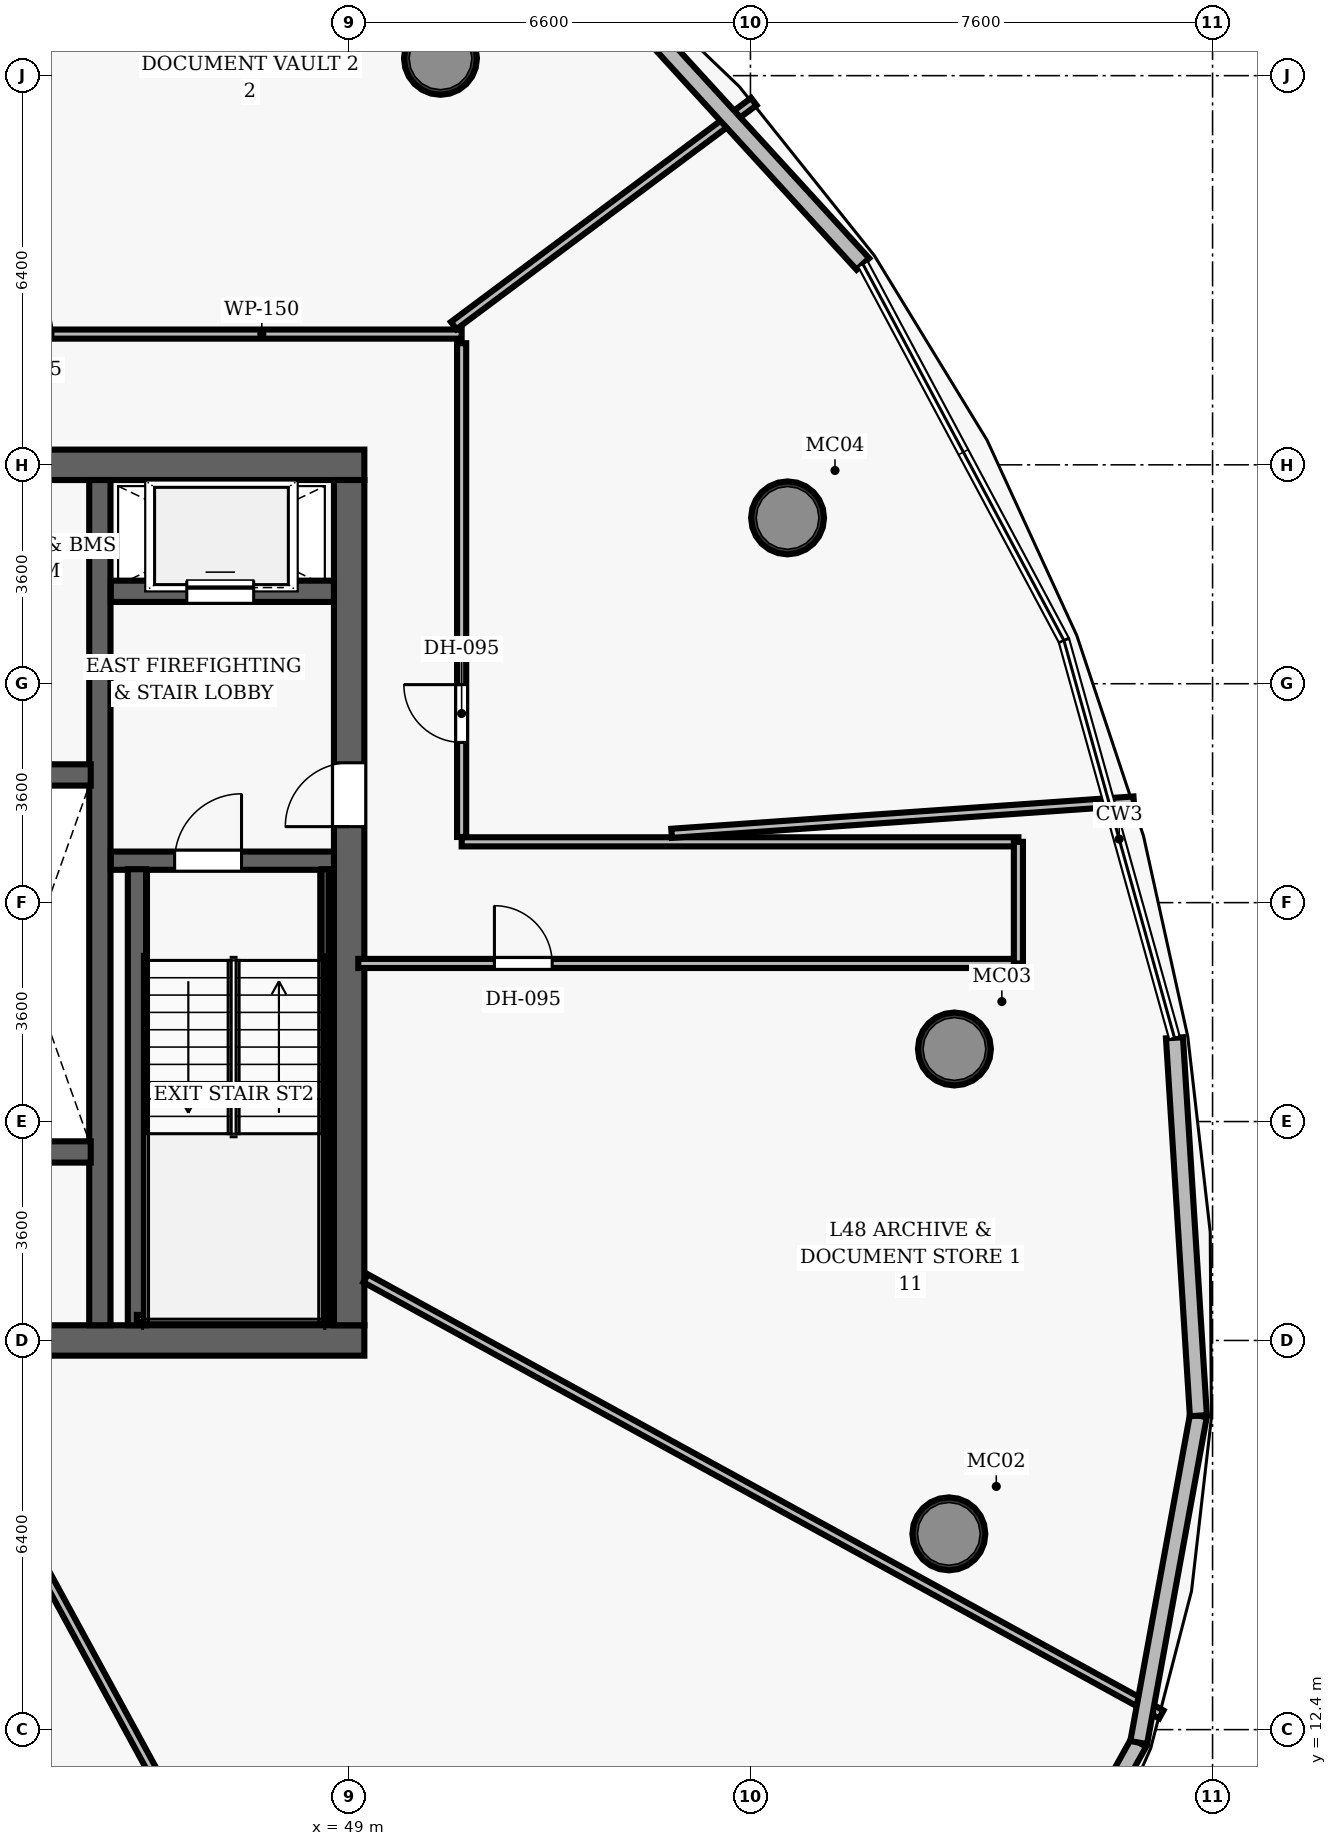
"""IFC4 building model, lengths in metres.
Left out: names, types, materials, properties, quantities, classifications, styles, units other than length and angle.
Written with IfcOpenShell. Run it as: python <this file> out.ifc"""

import sys

from ifc_helpers import new_model, si_unit, direction, frame, frame_2d, origin, origin_2d, place, context, subcontext, project, spatial, rectangle, hollow_circle, extrude, element, fill, save


model = new_model("IFC4")
c1 = context("Model", 3, precision=1e-05, world=origin(), true_north=direction((0.0, 1.0)))
c2 = subcontext(c1, "Body", "Model", "MODEL_VIEW")
j1 = project(units=[si_unit("LENGTHUNIT", "METRE"), si_unit("PLANEANGLEUNIT", "RADIAN")], contexts=[c1])
p1 = place(None, origin())
s1 = spatial("IfcSite", under=j1, at=p1, CompositionType="ELEMENT")
p2 = place(p1, origin())
s2 = spatial("IfcBuilding", under=s1, at=p2, CompositionType="ELEMENT")
p3 = place(p2, frame((0.0, 0.0, 190.45)))
s3 = spatial("IfcBuildingStorey", under=s2, at=p3, CompositionType="ELEMENT", Elevation=190.45)
p4 = place(p3, frame((26.75, 18.8, 0.0), z_axis=(0.0, 0.0, 1.0), x_axis=(1.0, 0.0, 0.0)))
e1 = element("IfcWall", 1, at=p4, inside=s3, PredefinedType="SHEAR", context=c2, shape_type="SweptSolid", body=[
    extrude(rectangle(XDim=22.5, YDim=0.5, at=frame_2d((11.25, 0.0))), origin(), (0.0, 0.0, 1.0), 3.85),
])
p5 = place(p4, frame((14.47, 0.0, 0.0)))
e2 = element("IfcOpeningElement", 2, at=p5, cuts=e1, PredefinedType="OPENING", context=c2, shape_type="SweptSolid", body=[
    extrude(rectangle(XDim=1.05, YDim=2.15, at=frame_2d((0.525, 1.075))), frame((0.0, 0.26, 0.0), z_axis=(0.0, -1.0, 0.0), x_axis=(1.0, 0.0, 0.0)), (0.0, 0.0, 1.0), 0.52),
])
p6 = place(p3, frame((26.75, 33.2, 0.0), z_axis=(0.0, 0.0, 1.0), x_axis=(1.0, 0.0, 0.0)))
e3 = element("IfcWall", 3, at=p6, inside=s3, PredefinedType="SHEAR", context=c2, shape_type="SweptSolid", body=[
    extrude(rectangle(XDim=22.5, YDim=0.5, at=frame_2d((11.25, 0.0))), origin(), (0.0, 0.0, 1.0), 3.85),
])
p7 = place(p6, frame((4.57, 0.0, 0.0)))
e4 = element("IfcOpeningElement", 4, at=p7, cuts=e3, PredefinedType="OPENING", context=c2, shape_type="SweptSolid", body=[
    extrude(rectangle(XDim=1.05, YDim=2.15, at=frame_2d((0.525, 1.075))), frame((0.0, 0.26, 0.0), z_axis=(0.0, -1.0, 0.0), x_axis=(1.0, 0.0, 0.0)), (0.0, 0.0, 1.0), 0.52),
])
p8 = place(p6, frame((14.47, 0.0, 0.0)))
e5 = element("IfcOpeningElement", 5, at=p8, cuts=e3, PredefinedType="OPENING", context=c2, shape_type="SweptSolid", body=[
    extrude(rectangle(XDim=1.05, YDim=2.15, at=frame_2d((0.525, 1.075))), frame((0.0, 0.26, 0.0), z_axis=(0.0, -1.0, 0.0), x_axis=(1.0, 0.0, 0.0)), (0.0, 0.0, 1.0), 0.52),
])
p9 = place(p3, frame((49.0, 19.05, 0.0), z_axis=(0.0, 0.0, 1.0), x_axis=(0.0, 1.0, 0.0)))
e6 = element("IfcWall", 6, at=p9, inside=s3, PredefinedType="SHEAR", context=c2, shape_type="SweptSolid", body=[
    extrude(rectangle(XDim=13.9, YDim=0.5, at=frame_2d((6.95, 0.0))), origin(), (0.0, 0.0, 1.0), 3.85),
])
p10 = place(p9, frame((8.2, 0.0, 0.0)))
e7 = element("IfcOpeningElement", 7, at=p10, cuts=e6, PredefinedType="OPENING", context=c2, shape_type="SweptSolid", body=[
    extrude(rectangle(XDim=1.05, YDim=2.15, at=frame_2d((0.525, 1.075))), frame((0.0, 0.26, 0.0), z_axis=(0.0, -1.0, 0.0), x_axis=(1.0, 0.0, 0.0)), (0.0, 0.0, 1.0), 0.52),
])
p11 = place(p3, frame((44.9, 19.05, 0.0), z_axis=(0.0, 0.0, 1.0), x_axis=(0.0, 1.0, 0.0)))
e8 = element("IfcWall", 8, at=p11, inside=s3, PredefinedType="SHEAR", context=c2, shape_type="SweptSolid", body=[
    extrude(rectangle(XDim=13.9, YDim=0.35, at=frame_2d((6.95, 0.0))), origin(), (0.0, 0.0, 1.0), 3.85),
])
for number, where, z_axis, x_axis in (
    (9, (58.863, 15.619, 0.0), (0.0, 0.0, 1.0), (1.0, 0.0, 0.0)),
    (10, (58.955, 23.594, 0.0), (0.0, 0.0, 1.0), (1.0, 0.0, 0.0)),
    (11, (56.21, 32.327, 0.0), (0.0, 0.0, 1.0), (1.0, 0.0, 0.0)),
    (12, (50.502, 39.885, 0.0), (0.0, 0.0, 1.0), (1.0, 0.0, 0.0)),
):
    element("IfcColumn", number, at=place(p3, frame(where, z_axis=z_axis, x_axis=x_axis)), inside=s3, PredefinedType="COLUMN", context=c2, shape_type="SweptSolid", body=[
        extrude(hollow_circle(Radius=0.6, WallThickness=0.05, at=origin_2d()), origin(), (0.0, 0.0, 1.0), 3.85),
    ])
p12 = place(p3, frame((45.08, 26.69, 0.0), z_axis=(0.0, 0.0, 1.0), x_axis=(1.0, 0.0, 0.0)))
e13 = element("IfcWall", 13, at=p12, inside=s3, PredefinedType="SHEAR", context=c2, shape_type="SweptSolid", body=[
    extrude(rectangle(XDim=3.67, YDim=0.3, at=frame_2d((1.835, 0.0))), origin(), (0.0, 0.0, 1.0), 3.85),
])
p13 = place(p12, frame((1.05, 0.0, 0.0)))
e14 = element("IfcOpeningElement", 14, at=p13, cuts=e13, PredefinedType="OPENING", context=c2, shape_type="SweptSolid", body=[
    extrude(rectangle(XDim=1.1, YDim=2.15, at=frame_2d((0.55, 1.075))), frame((0.0, 0.16, 0.0), z_axis=(0.0, -1.0, 0.0), x_axis=(1.0, 0.0, 0.0)), (0.0, 0.0, 1.0), 0.32),
])
p14 = place(p3, frame((45.51, 19.05, 0.0), z_axis=(0.0, 0.0, 1.0), x_axis=(0.0, 1.0, 0.0)))
e15 = element("IfcWall", 15, at=p14, inside=s3, PredefinedType="SHEAR", context=c2, shape_type="SweptSolid", body=[
    extrude(rectangle(XDim=7.5, YDim=0.3, at=frame_2d((3.75, 0.0))), origin(), (0.0, 0.0, 1.0), 3.85),
])
p15 = place(p3, frame((48.605, 19.1, 0.0), z_axis=(0.0, 0.0, 1.0), x_axis=(0.0, 1.0, 0.0)))
e16 = element("IfcWall", 16, at=p15, inside=s3, PredefinedType="SHEAR", context=c2, shape_type="SweptSolid", body=[
    extrude(rectangle(XDim=7.45, YDim=0.12, at=frame_2d((3.725, 0.0))), origin(), (0.0, 0.0, 1.0), 3.85),
])
p16 = place(p3, frame((45.51, 19.16, 0.0), z_axis=(0.0, 0.0, 1.0), x_axis=(1.0, 0.0, 0.0)))
e17 = element("IfcWall", 17, at=p16, inside=s3, PredefinedType="SHEAR", context=c2, shape_type="SweptSolid", body=[
    extrude(rectangle(XDim=3.095, YDim=0.12, at=frame_2d((1.547, 0.0))), origin(), (0.0, 0.0, 1.0), 3.85),
])
p17 = place(p3, frame((45.08, 31.12, 0.0), z_axis=(0.0, 0.0, 1.0), x_axis=(1.0, 0.0, 0.0)))
e18 = element("IfcWall", 18, at=p17, inside=s3, PredefinedType="SHEAR", context=c2, shape_type="SweptSolid", body=[
    extrude(rectangle(XDim=3.67, YDim=0.35, at=frame_2d((1.835, 0.0))), origin(), (0.0, 0.0, 1.0), 3.035),
])
p18 = place(p17, frame((1.25, 0.0, 0.0)))
e19 = element("IfcOpeningElement", 19, at=p18, cuts=e18, PredefinedType="OPENING", context=c2, shape_type="SweptSolid", body=[
    extrude(rectangle(XDim=1.1, YDim=2.15, at=frame_2d((0.55, 1.075))), frame((0.0, 0.185, 0.0), z_axis=(0.0, -1.0, 0.0), x_axis=(1.0, 0.0, 0.0)), (0.0, 0.0, 1.0), 0.37),
])
for number, where, z_axis, x_axis in (
    (20, (42.72, 21.9, 0.0), (0.0, 0.0, 1.0), (1.0, 0.0, 0.0)),
    (21, (42.72, 28.1, 0.0), (0.0, 0.0, 1.0), (1.0, 0.0, 0.0)),
):
    element("IfcWall", number, at=place(p3, frame(where, z_axis=z_axis, x_axis=x_axis)), inside=s3, PredefinedType="SHEAR", context=c2, shape_type="SweptSolid", body=[
        extrude(rectangle(XDim=2.03, YDim=0.35, at=frame_2d((1.015, 0.0))), origin(), (0.0, 0.0, 1.0), 3.035),
    ])
p19 = place(p3, frame((24.85, 35.35, 0.0), z_axis=(0.0, 0.0, 1.0), x_axis=(1.0, 0.0, 0.0)))
e22 = element("IfcWall", 22, at=p19, inside=s3, PredefinedType="PARTITIONING", context=c2, shape_type="SweptSolid", body=[
    extrude(rectangle(XDim=26.0, YDim=0.15, at=frame_2d((13.0, 0.0))), origin(), (0.0, 0.0, 1.0), 3.035),
])
p20 = place(p19, frame((18.327, 0.0, 0.0)))
e23 = element("IfcOpeningElement", 23, at=p20, cuts=e22, PredefinedType="OPENING", context=c2, shape_type="SweptSolid", body=[
    extrude(rectangle(XDim=0.95, YDim=2.15, at=frame_2d((0.475, 1.075))), frame((0.0, 0.085, 0.0), z_axis=(0.0, -1.0, 0.0), x_axis=(1.0, 0.0, 0.0)), (0.0, 0.0, 1.0), 0.17),
])
p21 = place(p19, frame((11.881, 0.0, 0.0)))
e24 = element("IfcOpeningElement", 24, at=p21, cuts=e22, PredefinedType="OPENING", context=c2, shape_type="SweptSolid", body=[
    extrude(rectangle(XDim=0.95, YDim=2.15, at=frame_2d((0.475, 1.075))), frame((0.0, 0.085, 0.0), z_axis=(0.0, -1.0, 0.0), x_axis=(1.0, 0.0, 0.0)), (0.0, 0.0, 1.0), 0.17),
])
p22 = place(p19, frame((5.711, 0.0, 0.0)))
e25 = element("IfcOpeningElement", 25, at=p22, cuts=e22, PredefinedType="OPENING", context=c2, shape_type="SweptSolid", body=[
    extrude(rectangle(XDim=0.95, YDim=2.15, at=frame_2d((0.475, 1.075))), frame((0.0, 0.085, 0.0), z_axis=(0.0, -1.0, 0.0), x_axis=(1.0, 0.0, 0.0)), (0.0, 0.0, 1.0), 0.17),
])
p23 = place(p3, frame((50.85, 27.08, 0.0), z_axis=(0.0, 0.0, 1.0), x_axis=(0.0, 1.0, 0.0)))
e26 = element("IfcWall", 26, at=p23, inside=s3, PredefinedType="PARTITIONING", context=c2, shape_type="SweptSolid", body=[
    extrude(rectangle(XDim=8.12, YDim=0.15, at=frame_2d((4.06, 0.0))), origin(), (0.0, 0.0, 1.0), 3.035),
])
p24 = place(p23, frame((1.555, 0.0, 0.0)))
e27 = element("IfcOpeningElement", 27, at=p24, cuts=e26, PredefinedType="OPENING", context=c2, shape_type="SweptSolid", body=[
    extrude(rectangle(XDim=0.95, YDim=2.15, at=frame_2d((0.475, 1.075))), frame((0.0, 0.085, 0.0), z_axis=(0.0, -1.0, 0.0), x_axis=(1.0, 0.0, 0.0)), (0.0, 0.0, 1.0), 0.17),
])
p25 = place(p3, frame((50.85, 27.0, 0.0), z_axis=(0.0, 0.0, 1.0), x_axis=(1.0, 0.0, 0.0)))
e28 = element("IfcWall", 28, at=p25, inside=s3, PredefinedType="PARTITIONING", context=c2, shape_type="SweptSolid", body=[
    extrude(rectangle(XDim=9.157, YDim=0.15, at=frame_2d((4.578, 0.0))), origin(), (0.0, 0.0, 1.0), 3.035),
])
p26 = place(p3, frame((49.15, 25.0, 0.0), z_axis=(0.0, 0.0, 1.0), x_axis=(1.0, 0.0, 0.0)))
e29 = element("IfcWall", 29, at=p26, inside=s3, PredefinedType="PARTITIONING", context=c2, shape_type="SweptSolid", body=[
    extrude(rectangle(XDim=10.857, YDim=0.15, at=frame_2d((5.428, 0.0))), origin(), (0.0, 0.0, 1.0), 3.035),
])
p27 = place(p26, frame((2.239, 0.0, 0.0)))
e30 = element("IfcOpeningElement", 30, at=p27, cuts=e29, PredefinedType="OPENING", context=c2, shape_type="SweptSolid", body=[
    extrude(rectangle(XDim=0.95, YDim=2.15, at=frame_2d((0.475, 1.075))), frame((0.0, 0.085, 0.0), z_axis=(0.0, -1.0, 0.0), x_axis=(1.0, 0.0, 0.0)), (0.0, 0.0, 1.0), 0.17),
])
p28 = place(p3, frame((60.007, 25.0, 0.0), z_axis=(0.0, 0.0, 1.0), x_axis=(0.0, 1.0, 0.0)))
e31 = element("IfcWall", 31, at=p28, inside=s3, PredefinedType="PARTITIONING", context=c2, shape_type="SweptSolid", body=[
    extrude(rectangle(XDim=2.0, YDim=0.15, at=frame_2d((1.0, 0.0))), origin(), (0.0, 0.0, 1.0), 3.035),
])
p29 = place(p3, frame((54.303, 27.14, 0.0), z_axis=(0.0, 0.0, 1.0), x_axis=(0.997562514279, 0.069778435819, 0.0)))
e32 = element("IfcWall", 32, at=p29, inside=s3, PredefinedType="PARTITIONING", context=c2, shape_type="SweptSolid", body=[
    extrude(rectangle(XDim=7.62, YDim=0.15, at=frame_2d((3.81, 0.0))), origin(), (0.0, 0.0, 1.0), 3.035),
])
p30 = place(p3, frame((50.719, 35.49, 0.0), z_axis=(0.0, 0.0, 1.0), x_axis=(0.801486425079, 0.598012968433, 0.0)))
e33 = element("IfcWall", 33, at=p30, inside=s3, PredefinedType="PARTITIONING", context=c2, shape_type="SweptSolid", body=[
    extrude(rectangle(XDim=6.159, YDim=0.15, at=frame_2d((3.08, 0.0))), origin(), (0.0, 0.0, 1.0), 3.035),
])
p31 = place(p3, frame((41.557, 35.49, 0.0), z_axis=(0.0, 0.0, 1.0), x_axis=(0.350964338917, 0.936388825653, 0.0)))
e34 = element("IfcWall", 34, at=p31, inside=s3, PredefinedType="PARTITIONING", context=c2, shape_type="SweptSolid", body=[
    extrude(rectangle(XDim=11.436, YDim=0.15, at=frame_2d((5.718, 0.0))), origin(), (0.0, 0.0, 1.0), 3.035),
])
p32 = place(p3, frame((42.74, 17.287, 0.0), z_axis=(0.0, 0.0, 1.0), x_axis=(0.477857761116, -0.878437226067, 0.0)))
e35 = element("IfcWall", 35, at=p32, inside=s3, PredefinedType="PARTITIONING", context=c2, shape_type="SweptSolid", body=[
    extrude(rectangle(XDim=16.64, YDim=0.15, at=frame_2d((8.32, 0.0))), origin(), (0.0, 0.0, 1.0), 3.035),
])
p33 = place(p3, frame((49.27, 19.823, 0.0), z_axis=(0.0, 0.0, 1.0), x_axis=(0.876914727702, -0.48064598234, 0.0)))
e36 = element("IfcWall", 36, at=p33, inside=s3, PredefinedType="PARTITIONING", context=c2, shape_type="SweptSolid", body=[
    extrude(rectangle(XDim=14.924, YDim=0.15, at=frame_2d((7.462, 0.0))), origin(), (0.0, 0.0, 1.0), 3.035),
])
p34 = place(p3, frame((61.985, 12.188, 0.0), z_axis=(0.0, 0.0, 1.0), x_axis=(-0.485290067778, -0.874353218165, 0.0)))
e37 = element("IfcWall", 37, at=p34, inside=s3, PredefinedType="SOLIDWALL", context=c2, shape_type="SweptSolid", body=[
    extrude(rectangle(XDim=4.876, YDim=0.28, at=frame_2d((2.438, 0.0))), origin(), (0.0, 0.0, 1.0), 3.62),
])
p35 = place(p3, frame((62.967, 17.563, 0.0), z_axis=(0.0, 0.0, 1.0), x_axis=(-0.179644170525, -0.983731656498, 0.0)))
e38 = element("IfcWall", 38, at=p35, inside=s3, PredefinedType="SOLIDWALL", context=c2, shape_type="SweptSolid", body=[
    extrude(rectangle(XDim=5.465, YDim=0.28, at=frame_2d((2.732, 0.0))), origin(), (0.0, 0.0, 1.0), 3.62),
])
p36 = place(p3, frame((62.573, 23.777, 0.0), z_axis=(0.0, 0.0, 1.0), x_axis=(0.063169203269, -0.998002831538, 0.0)))
e39 = element("IfcWall", 39, at=p36, inside=s3, PredefinedType="SOLIDWALL", context=c2, shape_type="SweptSolid", body=[
    extrude(rectangle(XDim=6.226, YDim=0.28, at=frame_2d((3.113, 0.0))), origin(), (0.0, 0.0, 1.0), 3.62),
])
p37 = place(p3, frame((52.693, 41.702, 0.0), z_axis=(0.0, 0.0, 1.0), x_axis=(0.674996203947, -0.737821201008, 0.0)))
e40 = element("IfcWall", 40, at=p37, inside=s3, PredefinedType="SOLIDWALL", context=c2, shape_type="SweptSolid", body=[
    extrude(rectangle(XDim=7.045, YDim=0.28, at=frame_2d((3.523, 0.0))), origin(), (0.0, 0.0, 1.0), 3.62),
])
p38 = place(p13, origin())
e41 = element("IfcDoor", 41, at=p38, inside=s3, OperationType="SINGLE_SWING_RIGHT", PredefinedType="DOOR", context=c2, shape_type="SweptSolid", body=[
    extrude(rectangle(XDim=1.1, YDim=2.15, at=frame_2d((0.55, 1.075))), frame((0.0, 0.025, 0.0), z_axis=(0.0, -1.0, 0.0), x_axis=(1.0, 0.0, 0.0)), (0.0, 0.0, 1.0), 0.05),
])
fill(e14, e41)
p39 = place(p10, origin())
e42 = element("IfcDoor", 42, at=p39, inside=s3, OperationType="SINGLE_SWING_LEFT", PredefinedType="DOOR", context=c2, shape_type="SweptSolid", body=[
    extrude(rectangle(XDim=1.05, YDim=2.15, at=frame_2d((0.525, 1.075))), frame((0.0, 0.025, 0.0), z_axis=(0.0, -1.0, 0.0), x_axis=(1.0, 0.0, 0.0)), (0.0, 0.0, 1.0), 0.05),
])
fill(e7, e42)
p40 = place(p24, origin())
e43 = element("IfcDoor", 43, at=p40, inside=s3, OperationType="SINGLE_SWING_RIGHT", PredefinedType="DOOR", context=c2, shape_type="SweptSolid", body=[
    extrude(rectangle(XDim=0.95, YDim=2.15, at=frame_2d((0.475, 1.075))), frame((0.0, 0.025, 0.0), z_axis=(0.0, -1.0, 0.0), x_axis=(1.0, 0.0, 0.0)), (0.0, 0.0, 1.0), 0.05),
])
fill(e27, e43)
p41 = place(p20, origin())
e44 = element("IfcDoor", 44, at=p41, inside=s3, OperationType="SINGLE_SWING_LEFT", PredefinedType="DOOR", context=c2, shape_type="SweptSolid", body=[
    extrude(rectangle(XDim=0.95, YDim=2.15, at=frame_2d((0.475, 1.075))), frame((0.0, 0.025, 0.0), z_axis=(0.0, -1.0, 0.0), x_axis=(1.0, 0.0, 0.0)), (0.0, 0.0, 1.0), 0.05),
])
fill(e23, e44)
p42 = place(p27, origin())
e45 = element("IfcDoor", 45, at=p42, inside=s3, OperationType="SINGLE_SWING_LEFT", PredefinedType="DOOR", context=c2, shape_type="SweptSolid", body=[
    extrude(rectangle(XDim=0.95, YDim=2.15, at=frame_2d((0.475, 1.075))), frame((0.0, 0.025, 0.0), z_axis=(0.0, -1.0, 0.0), x_axis=(1.0, 0.0, 0.0)), (0.0, 0.0, 1.0), 0.05),
])
fill(e30, e45)
p43 = place(p18, origin())
e46 = element("IfcDoor", 46, at=p43, inside=s3, OperationType="SLIDING_TO_LEFT", PredefinedType="DOOR", context=c2, shape_type="SweptSolid", body=[
    extrude(rectangle(XDim=1.1, YDim=2.15, at=frame_2d((0.55, 1.075))), frame((0.0, 0.025, 0.0), z_axis=(0.0, -1.0, 0.0), x_axis=(1.0, 0.0, 0.0)), (0.0, 0.0, 1.0), 0.05),
])
fill(e19, e46)
save(model, sys.argv[1])
